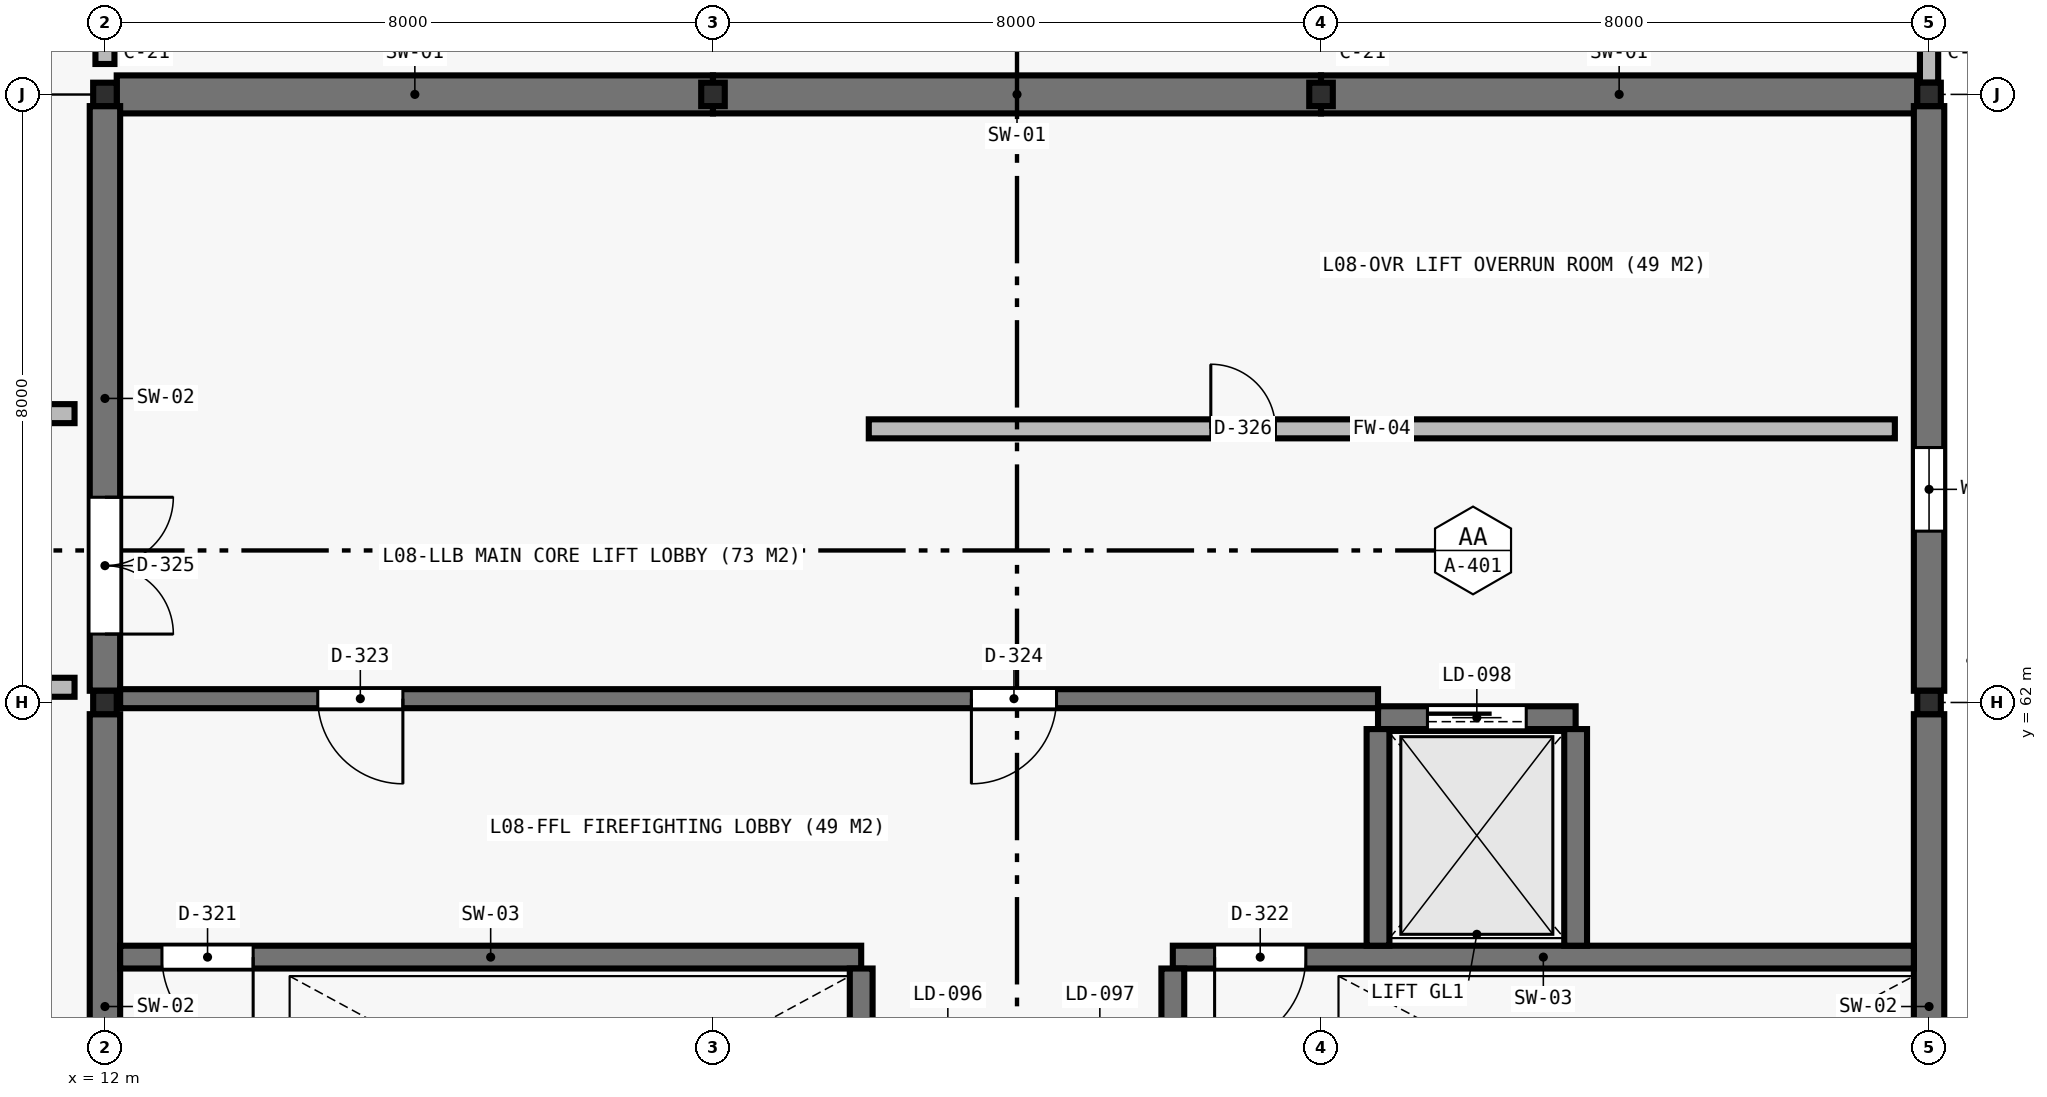
"""IFC4 building model, lengths in metres.
Left out: names, types, materials, properties, quantities, classifications, styles, units other than length and angle.
Written with IfcOpenShell. Run it as: python <this file> out.ifc"""

import sys

from ifc_helpers import new_model, si_unit, direction, frame, frame_2d, origin, origin_2d, place, context, subcontext, project, spatial, rectangle, i_section, extrude, element, fill, save


model = new_model("IFC4")
c1 = context("Model", 3, precision=1e-05, world=origin(), true_north=direction((0.0, 1.0)))
c2 = subcontext(c1, "Body", "Model", "MODEL_VIEW")
j1 = project(units=[si_unit("LENGTHUNIT", "METRE"), si_unit("PLANEANGLEUNIT", "RADIAN")], contexts=[c1])
p1 = place(None, origin())
s1 = spatial("IfcSite", under=j1, at=p1, CompositionType="ELEMENT")
p2 = place(p1, origin())
s2 = spatial("IfcBuilding", under=s1, at=p2, CompositionType="ELEMENT")
p3 = place(p2, frame((0.0, 0.0, 36.4)))
s3 = spatial("IfcBuildingStorey", under=s2, at=p3, CompositionType="ELEMENT", Elevation=36.4)
for number, where, z_axis, x_axis in (
    (1, (12.0, 62.0, 0.0), (0.0, 0.0, 1.0), (1.0, 0.0, 0.0)),
    (2, (12.0, 70.0, 0.0), (0.0, 0.0, 1.0), (1.0, 0.0, 0.0)),
    (3, (20.0, 70.0, 0.0), (0.0, 0.0, 1.0), (1.0, 0.0, 0.0)),
    (4, (28.0, 70.0, 0.0), (0.0, 0.0, 1.0), (1.0, 0.0, 0.0)),
    (5, (36.0, 62.0, 0.0), (0.0, 0.0, 1.0), (1.0, 0.0, 0.0)),
    (6, (36.0, 70.0, 0.0), (0.0, 0.0, 1.0), (1.0, 0.0, 0.0)),
):
    element("IfcColumn", number, at=place(p3, frame(where, z_axis=z_axis, x_axis=x_axis)), inside=s3, PredefinedType="COLUMN", context=c2, shape_type="SweptSolid", body=[
        extrude(i_section(OverallWidth=0.31, OverallDepth=0.308, WebThickness=0.015, FlangeThickness=0.015, at=origin_2d()), origin(), (0.0, 0.0, 1.0), 3.98),
    ])
p4 = place(p3, frame((12.155, 70.0, 0.0), z_axis=(0.0, 0.0, 1.0), x_axis=(1.0, 0.0, 0.0)))
e7 = element("IfcWall", 7, at=p4, inside=s3, PredefinedType="SHEAR", context=c2, shape_type="SweptSolid", body=[
    extrude(rectangle(XDim=7.845, YDim=0.5, at=frame_2d((3.922, 0.0))), origin(), (0.0, 0.0, 1.0), 3.98),
])
p5 = place(p3, frame((20.0, 70.0, 0.0), z_axis=(0.0, 0.0, 1.0), x_axis=(1.0, 0.0, 0.0)))
e8 = element("IfcWall", 8, at=p5, inside=s3, PredefinedType="SHEAR", context=c2, shape_type="SweptSolid", body=[
    extrude(rectangle(XDim=8.0, YDim=0.5, at=frame_2d((4.0, 0.0))), origin(), (0.0, 0.0, 1.0), 3.98),
])
p6 = place(p3, frame((28.0, 70.0, 0.0), z_axis=(0.0, 0.0, 1.0), x_axis=(1.0, 0.0, 0.0)))
e9 = element("IfcWall", 9, at=p6, inside=s3, PredefinedType="SHEAR", context=c2, shape_type="SweptSolid", body=[
    extrude(rectangle(XDim=7.845, YDim=0.5, at=frame_2d((3.922, 0.0))), origin(), (0.0, 0.0, 1.0), 3.98),
])
p7 = place(p3, frame((12.0, 54.154, 0.0), z_axis=(0.0, 0.0, 1.0), x_axis=(0.0, 1.0, 0.0)))
e10 = element("IfcWall", 10, at=p7, inside=s3, PredefinedType="SHEAR", context=c2, shape_type="SweptSolid", body=[
    extrude(rectangle(XDim=7.692, YDim=0.4, at=frame_2d((3.846, 0.0))), origin(), (0.0, 0.0, 1.0), 3.98),
])
p8 = place(p3, frame((12.0, 62.154, 0.0), z_axis=(0.0, 0.0, 1.0), x_axis=(0.0, 1.0, 0.0)))
e11 = element("IfcWall", 11, at=p8, inside=s3, PredefinedType="SHEAR", context=c2, shape_type="SweptSolid", body=[
    extrude(rectangle(XDim=7.692, YDim=0.4, at=frame_2d((3.846, 0.0))), origin(), (0.0, 0.0, 1.0), 3.98),
])
p9 = place(p8, frame((0.746, 0.0, 0.0)))
e12 = element("IfcOpeningElement", 12, at=p9, cuts=e11, PredefinedType="OPENING", context=c2, shape_type="SweptSolid", body=[
    extrude(rectangle(XDim=1.8, YDim=2.2, at=frame_2d((0.9, 1.1))), frame((0.0, 0.21, 0.0), z_axis=(0.0, -1.0, 0.0), x_axis=(1.0, 0.0, 0.0)), (0.0, 0.0, 1.0), 0.42),
])
p10 = place(p3, frame((36.0, 54.154, 0.0), z_axis=(0.0, 0.0, 1.0), x_axis=(0.0, 1.0, 0.0)))
e13 = element("IfcWall", 13, at=p10, inside=s3, PredefinedType="SHEAR", context=c2, shape_type="SweptSolid", body=[
    extrude(rectangle(XDim=7.692, YDim=0.4, at=frame_2d((3.846, 0.0))), origin(), (0.0, 0.0, 1.0), 3.98),
])
p11 = place(p3, frame((36.0, 62.154, 0.0), z_axis=(0.0, 0.0, 1.0), x_axis=(0.0, 1.0, 0.0)))
e14 = element("IfcWall", 14, at=p11, inside=s3, PredefinedType="SHEAR", context=c2, shape_type="SweptSolid", body=[
    extrude(rectangle(XDim=7.692, YDim=0.4, at=frame_2d((3.846, 0.0))), origin(), (0.0, 0.0, 1.0), 3.98),
])
p12 = place(p11, frame((2.1, 0.0, 0.95)))
e15 = element("IfcOpeningElement", 15, at=p12, cuts=e14, PredefinedType="OPENING", context=c2, shape_type="SweptSolid", body=[
    extrude(rectangle(XDim=1.1, YDim=2.3, at=frame_2d((0.55, 1.15))), frame((0.0, 0.21, 0.0), z_axis=(0.0, -1.0, 0.0), x_axis=(1.0, 0.0, 0.0)), (0.0, 0.0, 1.0), 0.42),
])
p13 = place(p3, frame((12.2, 58.65, 0.0), z_axis=(0.0, 0.0, 1.0), x_axis=(1.0, 0.0, 0.0)))
e16 = element("IfcWall", 16, at=p13, inside=s3, PredefinedType="SHEAR", context=c2, shape_type="SweptSolid", body=[
    extrude(rectangle(XDim=9.75, YDim=0.3, at=frame_2d((4.875, 0.0))), origin(), (0.0, 0.0, 1.0), 3.98),
])
p14 = place(p13, frame((0.55, 0.0, 0.0)))
e17 = element("IfcOpeningElement", 17, at=p14, cuts=e16, PredefinedType="OPENING", context=c2, shape_type="SweptSolid", body=[
    extrude(rectangle(XDim=1.2, YDim=2.2, at=frame_2d((0.6, 1.1))), frame((0.0, 0.16, 0.0), z_axis=(0.0, -1.0, 0.0), x_axis=(1.0, 0.0, 0.0)), (0.0, 0.0, 1.0), 0.32),
])
p15 = place(p3, frame((21.95, 54.25, 0.0), z_axis=(0.0, 0.0, 1.0), x_axis=(0.0, 1.0, 0.0)))
e18 = element("IfcWall", 18, at=p15, inside=s3, PredefinedType="SHEAR", context=c2, shape_type="SweptSolid", body=[
    extrude(rectangle(XDim=4.25, YDim=0.3, at=frame_2d((2.125, 0.0))), origin(), (0.0, 0.0, 1.0), 3.98),
])
p16 = place(p3, frame((26.05, 58.65, 0.0), z_axis=(0.0, 0.0, 1.0), x_axis=(1.0, 0.0, 0.0)))
e19 = element("IfcWall", 19, at=p16, inside=s3, PredefinedType="SHEAR", context=c2, shape_type="SweptSolid", body=[
    extrude(rectangle(XDim=9.75, YDim=0.3, at=frame_2d((4.875, 0.0))), origin(), (0.0, 0.0, 1.0), 3.98),
])
p17 = place(p16, frame((0.55, 0.0, 0.0)))
e20 = element("IfcOpeningElement", 20, at=p17, cuts=e19, PredefinedType="OPENING", context=c2, shape_type="SweptSolid", body=[
    extrude(rectangle(XDim=1.2, YDim=2.2, at=frame_2d((0.6, 1.1))), frame((0.0, 0.16, 0.0), z_axis=(0.0, -1.0, 0.0), x_axis=(1.0, 0.0, 0.0)), (0.0, 0.0, 1.0), 0.32),
])
p18 = place(p3, frame((26.05, 54.25, 0.0), z_axis=(0.0, 0.0, 1.0), x_axis=(0.0, 1.0, 0.0)))
e21 = element("IfcWall", 21, at=p18, inside=s3, PredefinedType="SHEAR", context=c2, shape_type="SweptSolid", body=[
    extrude(rectangle(XDim=4.25, YDim=0.3, at=frame_2d((2.125, 0.0))), origin(), (0.0, 0.0, 1.0), 3.98),
])
p19 = place(p3, frame((28.75, 61.8, 0.0), z_axis=(0.0, 0.0, 1.0), x_axis=(1.0, 0.0, 0.0)))
e22 = element("IfcWall", 22, at=p19, inside=s3, PredefinedType="SHEAR", context=c2, shape_type="SweptSolid", body=[
    extrude(rectangle(XDim=2.6, YDim=0.3, at=frame_2d((1.3, 0.0))), origin(), (0.0, 0.0, 1.0), 3.98),
])
p20 = place(p19, frame((0.65, 0.0, 0.0)))
e23 = element("IfcOpeningElement", 23, at=p20, cuts=e22, PredefinedType="OPENING", context=c2, shape_type="SweptSolid", body=[
    extrude(rectangle(XDim=1.3, YDim=2.3, at=frame_2d((0.65, 1.15))), frame((0.0, 0.16, 0.0), z_axis=(0.0, -1.0, 0.0), x_axis=(1.0, 0.0, 0.0)), (0.0, 0.0, 1.0), 0.32),
])
for number, where, z_axis, x_axis in (
    (24, (28.75, 58.8, 0.0), (0.0, 0.0, 1.0), (0.0, 1.0, 0.0)),
    (25, (31.35, 58.8, 0.0), (0.0, 0.0, 1.0), (0.0, 1.0, 0.0)),
):
    element("IfcWall", number, at=place(p3, frame(where, z_axis=z_axis, x_axis=x_axis)), inside=s3, PredefinedType="SHEAR", context=c2, shape_type="SweptSolid", body=[
        extrude(rectangle(XDim=2.85, YDim=0.3, at=frame_2d((1.425, 0.0))), origin(), (0.0, 0.0, 1.0), 3.98),
    ])
p21 = place(p3, frame((12.2, 62.05, 0.0), z_axis=(0.0, 0.0, 1.0), x_axis=(1.0, 0.0, 0.0)))
e26 = element("IfcWall", 26, at=p21, inside=s3, PredefinedType="SHEAR", context=c2, shape_type="SweptSolid", body=[
    extrude(rectangle(XDim=16.55, YDim=0.25, at=frame_2d((8.275, 0.0))), origin(), (0.0, 0.0, 1.0), 3.98),
])
p22 = place(p21, frame((2.6, 0.0, 0.0)))
e27 = element("IfcOpeningElement", 27, at=p22, cuts=e26, PredefinedType="OPENING", context=c2, shape_type="SweptSolid", body=[
    extrude(rectangle(XDim=1.12, YDim=2.22, at=frame_2d((0.56, 1.11))), frame((0.0, 0.135, 0.0), z_axis=(0.0, -1.0, 0.0), x_axis=(1.0, 0.0, 0.0)), (0.0, 0.0, 1.0), 0.27),
])
p23 = place(p21, frame((11.2, 0.0, 0.0)))
e28 = element("IfcOpeningElement", 28, at=p23, cuts=e26, PredefinedType="OPENING", context=c2, shape_type="SweptSolid", body=[
    extrude(rectangle(XDim=1.12, YDim=2.22, at=frame_2d((0.56, 1.11))), frame((0.0, 0.135, 0.0), z_axis=(0.0, -1.0, 0.0), x_axis=(1.0, 0.0, 0.0)), (0.0, 0.0, 1.0), 0.27),
])
p24 = place(p3, frame((36.0, 77.848, 0.0), z_axis=(0.0, 0.0, 1.0), x_axis=(0.0, -1.0, 0.0)))
e29 = element("IfcWall", 29, at=p24, inside=s3, PredefinedType="STANDARD", context=c2, shape_type="SweptSolid", body=[
    extrude(rectangle(XDim=7.694, YDim=0.24, at=frame_2d((3.847, 0.0))), origin(), (0.0, 0.0, 1.0), 3.573),
])
p25 = place(p24, frame((2.922, 0.0, 0.95)))
e30 = element("IfcOpeningElement", 30, at=p25, cuts=e29, PredefinedType="OPENING", context=c2, shape_type="SweptSolid", body=[
    extrude(rectangle(XDim=1.85, YDim=1.25, at=frame_2d((0.925, 0.625))), frame((0.0, 0.13, 0.0), z_axis=(0.0, -1.0, 0.0), x_axis=(1.0, 0.0, 0.0)), (0.0, 0.0, 1.0), 0.26),
])
for number, where, z_axis, x_axis in (
    (31, (35.85, 70.15, 4.2), (0.0, 0.0, 1.0), (0.0, 1.0, 0.0)),
    (32, (12.15, 70.15, 4.2), (0.0, 0.0, 1.0), (0.0, 1.0, 0.0)),
):
    element("IfcWall", number, at=place(p3, frame(where, z_axis=z_axis, x_axis=x_axis)), inside=s3, PredefinedType="PARAPET", context=c2, shape_type="SweptSolid", body=[
        extrude(rectangle(XDim=7.7, YDim=0.29, at=frame_2d((3.85, 0.0))), origin(), (0.0, 0.0, 1.0), 1.15),
    ])
p26 = place(p3, frame((12.15, 70.15, 4.2), z_axis=(0.0, 0.0, 1.0), x_axis=(1.0, 0.0, 0.0)))
e33 = element("IfcWall", 33, at=p26, inside=s3, PredefinedType="PARAPET", context=c2, shape_type="SweptSolid", body=[
    extrude(rectangle(XDim=23.7, YDim=0.29, at=frame_2d((11.85, 0.0))), origin(), (0.0, 0.0, 1.0), 1.15),
])
p27 = place(p3, frame((22.05, 65.6, 0.0), z_axis=(0.0, 0.0, 1.0), x_axis=(1.0, 0.0, 0.0)))
e34 = element("IfcWall", 34, at=p27, inside=s3, PredefinedType="SOLIDWALL", context=c2, shape_type="SweptSolid", body=[
    extrude(rectangle(XDim=13.5, YDim=0.25, at=frame_2d((6.75, 0.0))), origin(), (0.0, 0.0, 1.0), 3.98),
])
p28 = place(p27, frame((4.5, 0.0, 0.0)))
e35 = element("IfcOpeningElement", 35, at=p28, cuts=e34, PredefinedType="OPENING", context=c2, shape_type="SweptSolid", body=[
    extrude(rectangle(XDim=0.85, YDim=2.05, at=frame_2d((0.425, 1.025))), frame((0.0, 0.135, 0.0), z_axis=(0.0, -1.0, 0.0), x_axis=(1.0, 0.0, 0.0)), (0.0, 0.0, 1.0), 0.27),
])
p29 = place(p3, frame((4.3, 62.2, 0.0), z_axis=(0.0, 0.0, 1.0), x_axis=(1.0, 0.0, 0.0)))
e36 = element("IfcWall", 36, at=p29, inside=s3, PredefinedType="SOLIDWALL", context=c2, shape_type="SweptSolid", body=[
    extrude(rectangle(XDim=7.3, YDim=0.25, at=frame_2d((3.65, 0.0))), origin(), (0.0, 0.0, 1.0), 3.98),
])
p30 = place(p29, frame((2.2, 0.0, 0.0)))
e37 = element("IfcOpeningElement", 37, at=p30, cuts=e36, PredefinedType="OPENING", context=c2, shape_type="SweptSolid", body=[
    extrude(rectangle(XDim=1.8, YDim=2.2, at=frame_2d((0.9, 1.1))), frame((0.0, 0.135, 0.0), z_axis=(0.0, -1.0, 0.0), x_axis=(1.0, 0.0, 0.0)), (0.0, 0.0, 1.0), 0.27),
])
p31 = place(p3, frame((4.3, 65.8, 0.0), z_axis=(0.0, 0.0, 1.0), x_axis=(1.0, 0.0, 0.0)))
e38 = element("IfcWall", 38, at=p31, inside=s3, PredefinedType="SOLIDWALL", context=c2, shape_type="SweptSolid", body=[
    extrude(rectangle(XDim=7.3, YDim=0.25, at=frame_2d((3.65, 0.0))), origin(), (0.0, 0.0, 1.0), 3.98),
])
p32 = place(p31, frame((2.2, 0.0, 0.0)))
e39 = element("IfcOpeningElement", 39, at=p32, cuts=e38, PredefinedType="OPENING", context=c2, shape_type="SweptSolid", body=[
    extrude(rectangle(XDim=1.8, YDim=2.2, at=frame_2d((0.9, 1.1))), frame((0.0, 0.135, 0.0), z_axis=(0.0, -1.0, 0.0), x_axis=(1.0, 0.0, 0.0)), (0.0, 0.0, 1.0), 0.27),
])
p33 = place(p3, frame((12.0, 70.4, 0.0), z_axis=(0.0, 0.0, 1.0), x_axis=(0.0, 1.0, 0.0)))
e40 = element("IfcWall", 40, at=p33, inside=s3, PredefinedType="SOLIDWALL", context=c2, shape_type="SweptSolid", body=[
    extrude(rectangle(XDim=7.3, YDim=0.25, at=frame_2d((3.65, 0.0))), origin(), (0.0, 0.0, 1.0), 3.573),
])
p34 = place(p33, frame((2.6, 0.0, 0.0)))
e41 = element("IfcOpeningElement", 41, at=p34, cuts=e40, PredefinedType="OPENING", context=c2, shape_type="SweptSolid", body=[
    extrude(rectangle(XDim=1.0, YDim=2.15, at=frame_2d((0.5, 1.075))), frame((0.0, 0.135, 0.0), z_axis=(0.0, -1.0, 0.0), x_axis=(1.0, 0.0, 0.0)), (0.0, 0.0, 1.0), 0.27),
])
p35 = place(p12, origin())
e42 = element("IfcWindow", 42, at=p35, inside=s3, PartitioningType="SINGLE_PANEL", PredefinedType="WINDOW", context=c2, shape_type="SweptSolid", body=[
    extrude(rectangle(XDim=1.1, YDim=2.3, at=frame_2d((0.55, 1.15))), frame((0.0, 0.03, 0.0), z_axis=(0.0, -1.0, 0.0), x_axis=(1.0, 0.0, 0.0)), (0.0, 0.0, 1.0), 0.06),
])
fill(e15, e42)
p36 = place(p14, frame((1.2, 0.0, 0.0), z_axis=(0.0, 0.0, 1.0), x_axis=(-1.0, 0.0, 0.0)))
e43 = element("IfcDoor", 43, at=p36, inside=s3, OperationType="SINGLE_SWING_LEFT", PredefinedType="DOOR", context=c2, shape_type="SweptSolid", body=[
    extrude(rectangle(XDim=1.2, YDim=2.2, at=frame_2d((0.6, 1.1))), frame((0.0, 0.025, 0.0), z_axis=(0.0, -1.0, 0.0), x_axis=(1.0, 0.0, 0.0)), (0.0, 0.0, 1.0), 0.05),
])
fill(e17, e43)
p37 = place(p17, frame((1.2, 0.0, 0.0), z_axis=(0.0, 0.0, 1.0), x_axis=(-1.0, 0.0, 0.0)))
e44 = element("IfcDoor", 44, at=p37, inside=s3, OperationType="SINGLE_SWING_RIGHT", PredefinedType="DOOR", context=c2, shape_type="SweptSolid", body=[
    extrude(rectangle(XDim=1.2, YDim=2.2, at=frame_2d((0.6, 1.1))), frame((0.0, 0.025, 0.0), z_axis=(0.0, -1.0, 0.0), x_axis=(1.0, 0.0, 0.0)), (0.0, 0.0, 1.0), 0.05),
])
fill(e20, e44)
p38 = place(p20, origin())
e45 = element("IfcDoor", 45, at=p38, inside=s3, OperationType="SLIDING_TO_LEFT", PredefinedType="DOOR", context=c2, shape_type="SweptSolid", body=[
    extrude(rectangle(XDim=1.3, YDim=2.3, at=frame_2d((0.65, 1.15))), frame((0.0, 0.025, 0.0), z_axis=(0.0, -1.0, 0.0), x_axis=(1.0, 0.0, 0.0)), (0.0, 0.0, 1.0), 0.05),
])
fill(e23, e45)
p39 = place(p22, frame((1.12, 0.0, 0.0), z_axis=(0.0, 0.0, 1.0), x_axis=(-1.0, 0.0, 0.0)))
e46 = element("IfcDoor", 46, at=p39, inside=s3, OperationType="SINGLE_SWING_LEFT", PredefinedType="DOOR", context=c2, shape_type="SweptSolid", body=[
    extrude(rectangle(XDim=1.12, YDim=2.22, at=frame_2d((0.56, 1.11))), frame((0.0, 0.025, 0.0), z_axis=(0.0, -1.0, 0.0), x_axis=(1.0, 0.0, 0.0)), (0.0, 0.0, 1.0), 0.05),
])
fill(e27, e46)
p40 = place(p23, frame((1.12, 0.0, 0.0), z_axis=(0.0, 0.0, 1.0), x_axis=(-1.0, 0.0, 0.0)))
e47 = element("IfcDoor", 47, at=p40, inside=s3, OperationType="SINGLE_SWING_RIGHT", PredefinedType="DOOR", context=c2, shape_type="SweptSolid", body=[
    extrude(rectangle(XDim=1.12, YDim=2.22, at=frame_2d((0.56, 1.11))), frame((0.0, 0.025, 0.0), z_axis=(0.0, -1.0, 0.0), x_axis=(1.0, 0.0, 0.0)), (0.0, 0.0, 1.0), 0.05),
])
fill(e28, e47)
p41 = place(p9, frame((1.8, 0.0, 0.0), z_axis=(0.0, 0.0, 1.0), x_axis=(-1.0, 0.0, 0.0)))
e48 = element("IfcDoor", 48, at=p41, inside=s3, OperationType="DOUBLE_DOOR_SINGLE_SWING", PredefinedType="DOOR", context=c2, shape_type="SweptSolid", body=[
    extrude(rectangle(XDim=1.8, YDim=2.2, at=frame_2d((0.9, 1.1))), frame((0.0, 0.025, 0.0), z_axis=(0.0, -1.0, 0.0), x_axis=(1.0, 0.0, 0.0)), (0.0, 0.0, 1.0), 0.05),
])
fill(e12, e48)
p42 = place(p28, origin())
e49 = element("IfcDoor", 49, at=p42, inside=s3, OperationType="SINGLE_SWING_LEFT", PredefinedType="DOOR", context=c2, shape_type="SweptSolid", body=[
    extrude(rectangle(XDim=0.85, YDim=2.05, at=frame_2d((0.425, 1.025))), frame((0.0, 0.025, 0.0), z_axis=(0.0, -1.0, 0.0), x_axis=(1.0, 0.0, 0.0)), (0.0, 0.0, 1.0), 0.05),
])
fill(e35, e49)
save(model, sys.argv[1])
